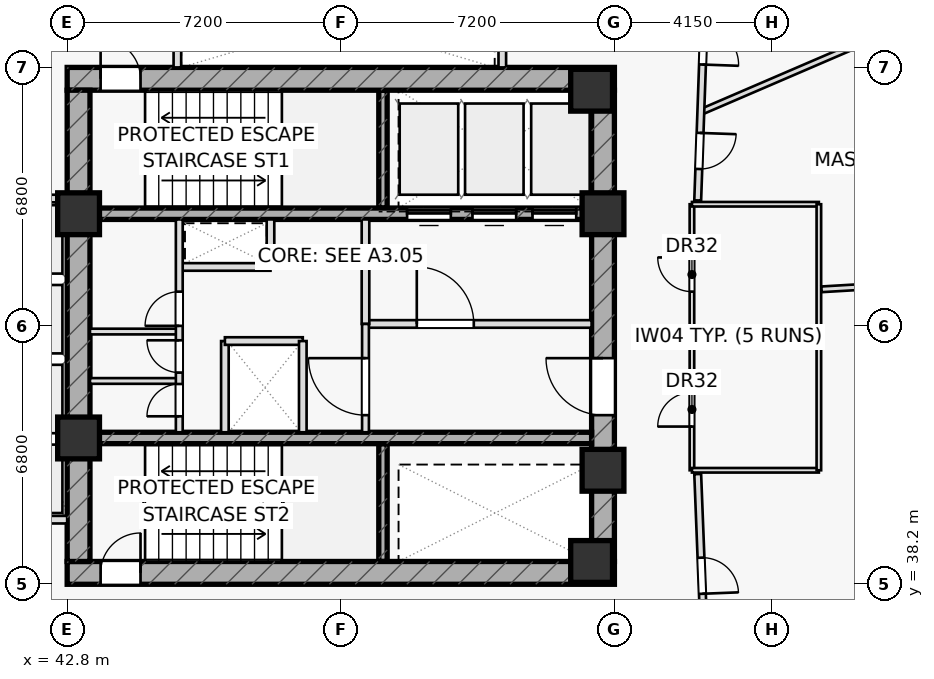
"""IFC4 building model, lengths in metres.
Left out: names, types, materials, properties, quantities, classifications, styles, units other than length and angle.
Written with IfcOpenShell. Run it as: python <this file> out.ifc"""

import sys

from ifc_helpers import new_model, si_unit, direction, frame, frame_2d, origin, origin_2d, place, context, subcontext, project, spatial, rectangle, extrude, element, fill, save


model = new_model("IFC4")
c1 = context("Model", 3, precision=1e-05, world=origin(), true_north=direction((0.0, 1.0)))
c2 = subcontext(c1, "Body", "Model", "MODEL_VIEW")
j1 = project(units=[si_unit("LENGTHUNIT", "METRE"), si_unit("PLANEANGLEUNIT", "RADIAN")], contexts=[c1])
p1 = place(None, origin())
s1 = spatial("IfcSite", under=j1, at=p1, CompositionType="ELEMENT")
p2 = place(p1, origin())
s2 = spatial("IfcBuilding", under=s1, at=p2, CompositionType="ELEMENT")
p3 = place(p2, frame((0.0, 0.0, 54.9)))
s3 = spatial("IfcBuildingStorey", under=s2, at=p3, CompositionType="ELEMENT", Elevation=54.9)
for number, where, z_axis, x_axis in (
    (1, (51.11, 48.1, 0.0), (0.0, 0.0, 1.0), (0.0, 1.0, 0.0)),
    (2, (51.11, 38.8, 0.0), (0.0, 0.0, 1.0), (0.0, 1.0, 0.0)),
):
    element("IfcWall", number, at=place(p3, frame(where, z_axis=z_axis, x_axis=x_axis)), inside=s3, PredefinedType="SHEAR", context=c2, shape_type="SweptSolid", body=[
        extrude(rectangle(XDim=3.1, YDim=0.22, at=frame_2d((1.55, 0.0))), origin(), (0.0, 0.0, 1.0), 3.6),
    ])
p4 = place(p3, frame((42.8, 51.5, 0.0), z_axis=(0.0, 0.0, 1.0), x_axis=(1.0, 0.0, 0.0)))
e3 = element("IfcWall", 3, at=p4, inside=s3, PredefinedType="SHEAR", context=c2, shape_type="SweptSolid", body=[
    extrude(rectangle(XDim=14.4, YDim=0.6, at=frame_2d((7.2, 0.0))), origin(), (0.0, 0.0, 1.0), 3.6),
])
p5 = place(p4, frame((0.88, 0.0, 0.0)))
e4 = element("IfcOpeningElement", 4, at=p5, cuts=e3, PredefinedType="OPENING", context=c2, shape_type="SweptSolid", body=[
    extrude(rectangle(XDim=1.05, YDim=2.2, at=frame_2d((0.525, 1.1))), frame((0.0, 0.31, 0.0), z_axis=(0.0, -1.0, 0.0), x_axis=(1.0, 0.0, 0.0)), (0.0, 0.0, 1.0), 0.62),
])
p6 = place(p3, frame((42.8, 38.5, 0.0), z_axis=(0.0, 0.0, 1.0), x_axis=(1.0, 0.0, 0.0)))
e5 = element("IfcWall", 5, at=p6, inside=s3, PredefinedType="SHEAR", context=c2, shape_type="SweptSolid", body=[
    extrude(rectangle(XDim=14.4, YDim=0.6, at=frame_2d((7.2, 0.0))), origin(), (0.0, 0.0, 1.0), 3.6),
])
p7 = place(p6, frame((0.88, 0.0, 0.0)))
e6 = element("IfcOpeningElement", 6, at=p7, cuts=e5, PredefinedType="OPENING", context=c2, shape_type="SweptSolid", body=[
    extrude(rectangle(XDim=1.05, YDim=2.2, at=frame_2d((0.525, 1.1))), frame((0.0, 0.31, 0.0), z_axis=(0.0, -1.0, 0.0), x_axis=(1.0, 0.0, 0.0)), (0.0, 0.0, 1.0), 0.62),
])
p8 = place(p3, frame((43.1, 38.8, 0.0), z_axis=(0.0, 0.0, 1.0), x_axis=(0.0, 1.0, 0.0)))
e7 = element("IfcWall", 7, at=p8, inside=s3, PredefinedType="SHEAR", context=c2, shape_type="SweptSolid", body=[
    extrude(rectangle(XDim=12.4, YDim=0.6, at=frame_2d((6.2, 0.0))), origin(), (0.0, 0.0, 1.0), 3.6),
])
p9 = place(p3, frame((56.9, 38.8, 0.0), z_axis=(0.0, 0.0, 1.0), x_axis=(0.0, 1.0, 0.0)))
e8 = element("IfcWall", 8, at=p9, inside=s3, PredefinedType="SHEAR", context=c2, shape_type="SweptSolid", body=[
    extrude(rectangle(XDim=12.4, YDim=0.6, at=frame_2d((6.2, 0.0))), origin(), (0.0, 0.0, 1.0), 3.6),
])
p10 = place(p9, frame((3.85, 0.0, 0.0)))
e9 = element("IfcOpeningElement", 9, at=p10, cuts=e8, PredefinedType="OPENING", context=c2, shape_type="SweptSolid", body=[
    extrude(rectangle(XDim=1.5, YDim=2.2, at=frame_2d((0.75, 1.1))), frame((0.0, 0.31, 0.0), z_axis=(0.0, -1.0, 0.0), x_axis=(1.0, 0.0, 0.0)), (0.0, 0.0, 1.0), 0.62),
])
p11 = place(p3, frame((43.4, 47.95, 0.0), z_axis=(0.0, 0.0, 1.0), x_axis=(1.0, 0.0, 0.0)))
e10 = element("IfcWall", 10, at=p11, inside=s3, PredefinedType="SHEAR", context=c2, shape_type="SweptSolid", body=[
    extrude(rectangle(XDim=13.2, YDim=0.3, at=frame_2d((6.6, 0.0))), origin(), (0.0, 0.0, 1.0), 3.6),
])
p12 = place(p11, frame((8.345, 0.0, 0.0)))
e11 = element("IfcOpeningElement", 11, at=p12, cuts=e10, PredefinedType="OPENING", context=c2, shape_type="SweptSolid", body=[
    extrude(rectangle(XDim=1.15, YDim=2.2, at=frame_2d((0.575, 1.1))), frame((0.0, 0.16, 0.0), z_axis=(0.0, -1.0, 0.0), x_axis=(1.0, 0.0, 0.0)), (0.0, 0.0, 1.0), 0.32),
])
p13 = place(p11, frame((10.065, 0.0, 0.0)))
e12 = element("IfcOpeningElement", 12, at=p13, cuts=e10, PredefinedType="OPENING", context=c2, shape_type="SweptSolid", body=[
    extrude(rectangle(XDim=1.15, YDim=2.2, at=frame_2d((0.575, 1.1))), frame((0.0, 0.16, 0.0), z_axis=(0.0, -1.0, 0.0), x_axis=(1.0, 0.0, 0.0)), (0.0, 0.0, 1.0), 0.32),
])
p14 = place(p11, frame((11.645, 0.0, 0.0)))
e13 = element("IfcOpeningElement", 13, at=p14, cuts=e10, PredefinedType="OPENING", context=c2, shape_type="SweptSolid", body=[
    extrude(rectangle(XDim=1.15, YDim=2.2, at=frame_2d((0.575, 1.1))), frame((0.0, 0.16, 0.0), z_axis=(0.0, -1.0, 0.0), x_axis=(1.0, 0.0, 0.0)), (0.0, 0.0, 1.0), 0.32),
])
p15 = place(p3, frame((43.4, 42.05, 0.0), z_axis=(0.0, 0.0, 1.0), x_axis=(1.0, 0.0, 0.0)))
e14 = element("IfcWall", 14, at=p15, inside=s3, PredefinedType="SHEAR", context=c2, shape_type="SweptSolid", body=[
    extrude(rectangle(XDim=13.2, YDim=0.3, at=frame_2d((6.6, 0.0))), origin(), (0.0, 0.0, 1.0), 3.6),
])
for number, where, z_axis, x_axis in (
    (15, (43.1, 47.95, 0.0), (0.0, 0.0, 1.0), (1.0, 0.0, 0.0)),
    (16, (56.9, 47.95, 0.0), (0.0, 0.0, 1.0), (1.0, 0.0, 0.0)),
    (17, (56.6, 51.2, 0.0), (0.0, 0.0, 1.0), (1.0, 0.0, 0.0)),
    (18, (43.1, 42.05, 0.0), (0.0, 0.0, 1.0), (1.0, 0.0, 0.0)),
    (19, (56.9, 41.2, 0.0), (0.0, 0.0, 1.0), (1.0, 0.0, 0.0)),
    (20, (56.6, 38.8, 0.0), (0.0, 0.0, 1.0), (1.0, 0.0, 0.0)),
):
    element("IfcColumn", number, at=place(p3, frame(where, z_axis=z_axis, x_axis=x_axis)), inside=s3, PredefinedType="COLUMN", context=c2, shape_type="SweptSolid", body=[
        extrude(rectangle(XDim=1.1, YDim=1.1, at=origin_2d()), origin(), (0.0, 0.0, 1.0), 3.6),
    ])
for number, where, z_axis, x_axis in (
    (21, (40.3, 39.9, 0.0), (0.0, 0.0, 1.0), (1.0, 0.0, 0.0)),
    (22, (40.3, 48.35, 0.0), (0.0, 0.0, 1.0), (1.0, 0.0, 0.0)),
    (23, (45.7, 51.8, 0.0), (0.0, 0.0, 1.0), (0.0, 1.0, 0.0)),
    (24, (54.25, 51.8, 0.0), (0.0, 0.0, 1.0), (0.0, 1.0, 0.0)),
):
    element("IfcWall", number, at=place(p3, frame(where, z_axis=z_axis, x_axis=x_axis)), inside=s3, PredefinedType="PARTITIONING", context=c2, shape_type="SweptSolid", body=[
        extrude(rectangle(XDim=2.5, YDim=0.2, at=frame_2d((1.25, 0.0))), origin(), (0.0, 0.0, 1.0), 3.6),
    ])
p16 = place(p3, frame((45.75, 46.55, 0.0), z_axis=(0.0, 0.0, 1.0), x_axis=(1.0, 0.0, 0.0)))
e25 = element("IfcWall", 25, at=p16, inside=s3, PredefinedType="PARTITIONING", context=c2, shape_type="SweptSolid", body=[
    extrude(rectangle(XDim=2.4, YDim=0.2, at=frame_2d((1.2, 0.0))), origin(), (0.0, 0.0, 1.0), 3.6),
])
p17 = place(p3, frame((48.15, 46.55, 0.0), z_axis=(0.0, 0.0, 1.0), x_axis=(0.0, 1.0, 0.0)))
e26 = element("IfcWall", 26, at=p17, inside=s3, PredefinedType="PARTITIONING", context=c2, shape_type="SweptSolid", body=[
    extrude(rectangle(XDim=1.25, YDim=0.2, at=frame_2d((0.625, 0.0))), origin(), (0.0, 0.0, 1.0), 3.6),
])
p18 = place(p3, frame((46.95, 42.2, 0.0), z_axis=(0.0, 0.0, 1.0), x_axis=(0.0, 1.0, 0.0)))
e27 = element("IfcWall", 27, at=p18, inside=s3, PredefinedType="PARTITIONING", context=c2, shape_type="SweptSolid", body=[
    extrude(rectangle(XDim=2.4, YDim=0.2, at=frame_2d((1.2, 0.0))), origin(), (0.0, 0.0, 1.0), 3.6),
])
p19 = place(p3, frame((46.95, 44.6, 0.0), z_axis=(0.0, 0.0, 1.0), x_axis=(1.0, 0.0, 0.0)))
e28 = element("IfcWall", 28, at=p19, inside=s3, PredefinedType="PARTITIONING", context=c2, shape_type="SweptSolid", body=[
    extrude(rectangle(XDim=2.05, YDim=0.2, at=frame_2d((1.025, 0.0))), origin(), (0.0, 0.0, 1.0), 3.6),
])
p20 = place(p3, frame((50.65, 45.05, 0.0), z_axis=(0.0, 0.0, 1.0), x_axis=(1.0, 0.0, 0.0)))
e29 = element("IfcWall", 29, at=p20, inside=s3, PredefinedType="PARTITIONING", context=c2, shape_type="SweptSolid", body=[
    extrude(rectangle(XDim=5.95, YDim=0.2, at=frame_2d((2.975, 0.0))), origin(), (0.0, 0.0, 1.0), 3.6),
])
p21 = place(p20, frame((1.35, 0.0, 0.0)))
e30 = element("IfcOpeningElement", 30, at=p21, cuts=e29, PredefinedType="OPENING", context=c2, shape_type="SweptSolid", body=[
    extrude(rectangle(XDim=1.5, YDim=2.2, at=frame_2d((0.75, 1.1))), frame((0.0, 0.11, 0.0), z_axis=(0.0, -1.0, 0.0), x_axis=(1.0, 0.0, 0.0)), (0.0, 0.0, 1.0), 0.22),
])
p22 = place(p3, frame((50.65, 45.05, 0.0), z_axis=(0.0, 0.0, 1.0), x_axis=(0.0, 1.0, 0.0)))
e31 = element("IfcWall", 31, at=p22, inside=s3, PredefinedType="PARTITIONING", context=c2, shape_type="SweptSolid", body=[
    extrude(rectangle(XDim=2.75, YDim=0.2, at=frame_2d((1.375, 0.0))), origin(), (0.0, 0.0, 1.0), 3.6),
])
p23 = place(p3, frame((50.65, 42.2, 0.0), z_axis=(0.0, 0.0, 1.0), x_axis=(0.0, 1.0, 0.0)))
e32 = element("IfcWall", 32, at=p23, inside=s3, PredefinedType="PARTITIONING", context=c2, shape_type="SweptSolid", body=[
    extrude(rectangle(XDim=2.85, YDim=0.18, at=frame_2d((1.425, 0.0))), origin(), (0.0, 0.0, 1.0), 3.6),
])
p24 = place(p23, frame((0.45, 0.0, 0.0)))
e33 = element("IfcOpeningElement", 33, at=p24, cuts=e32, PredefinedType="OPENING", context=c2, shape_type="SweptSolid", body=[
    extrude(rectangle(XDim=1.5, YDim=2.2, at=frame_2d((0.75, 1.1))), frame((0.0, 0.1, 0.0), z_axis=(0.0, -1.0, 0.0), x_axis=(1.0, 0.0, 0.0)), (0.0, 0.0, 1.0), 0.2),
])
for number, where, z_axis, x_axis in (
    (34, (43.4, 43.55, 0.0), (0.0, 0.0, 1.0), (1.0, 0.0, 0.0)),
    (35, (43.4, 44.85, 0.0), (0.0, 0.0, 1.0), (1.0, 0.0, 0.0)),
):
    element("IfcWall", number, at=place(p3, frame(where, z_axis=z_axis, x_axis=x_axis)), inside=s3, PredefinedType="PARTITIONING", context=c2, shape_type="SweptSolid", body=[
        extrude(rectangle(XDim=2.35, YDim=0.15, at=frame_2d((1.175, 0.0))), origin(), (0.0, 0.0, 1.0), 3.6),
    ])
p25 = place(p3, frame((45.75, 42.2, 0.0), z_axis=(0.0, 0.0, 1.0), x_axis=(0.0, 1.0, 0.0)))
e36 = element("IfcWall", 36, at=p25, inside=s3, PredefinedType="PARTITIONING", context=c2, shape_type="SweptSolid", body=[
    extrude(rectangle(XDim=5.6, YDim=0.18, at=frame_2d((2.8, 0.0))), origin(), (0.0, 0.0, 1.0), 3.6),
])
p26 = place(p25, frame((0.42, 0.0, 0.0)))
e37 = element("IfcOpeningElement", 37, at=p26, cuts=e36, PredefinedType="OPENING", context=c2, shape_type="SweptSolid", body=[
    extrude(rectangle(XDim=0.85, YDim=2.05, at=frame_2d((0.425, 1.025))), frame((0.0, 0.1, 0.0), z_axis=(0.0, -1.0, 0.0), x_axis=(1.0, 0.0, 0.0)), (0.0, 0.0, 1.0), 0.2),
])
p27 = place(p25, frame((1.57, 0.0, 0.0)))
e38 = element("IfcOpeningElement", 38, at=p27, cuts=e36, PredefinedType="OPENING", context=c2, shape_type="SweptSolid", body=[
    extrude(rectangle(XDim=0.85, YDim=2.05, at=frame_2d((0.425, 1.025))), frame((0.0, 0.1, 0.0), z_axis=(0.0, -1.0, 0.0), x_axis=(1.0, 0.0, 0.0)), (0.0, 0.0, 1.0), 0.2),
])
p28 = place(p25, frame((2.8, 0.0, 0.0)))
e39 = element("IfcOpeningElement", 39, at=p28, cuts=e36, PredefinedType="OPENING", context=c2, shape_type="SweptSolid", body=[
    extrude(rectangle(XDim=0.9, YDim=2.05, at=frame_2d((0.45, 1.025))), frame((0.0, 0.1, 0.0), z_axis=(0.0, -1.0, 0.0), x_axis=(1.0, 0.0, 0.0)), (0.0, 0.0, 1.0), 0.2),
])
p29 = place(p3, frame((59.24, 41.2, 0.0), z_axis=(0.0, 0.0, 1.0), x_axis=(0.0, 1.0, 0.0)))
e40 = element("IfcWall", 40, at=p29, inside=s3, PredefinedType="PARTITIONING", context=c2, shape_type="SweptSolid", body=[
    extrude(rectangle(XDim=7.0, YDim=0.12, at=frame_2d((3.5, 0.0))), origin(), (0.0, 0.0, 1.0), 3.6),
])
p30 = place(p29, frame((1.15, 0.0, 0.0)))
e41 = element("IfcOpeningElement", 41, at=p30, cuts=e40, PredefinedType="OPENING", context=c2, shape_type="SweptSolid", body=[
    extrude(rectangle(XDim=0.9, YDim=2.05, at=frame_2d((0.45, 1.025))), frame((0.0, 0.07, 0.0), z_axis=(0.0, -1.0, 0.0), x_axis=(1.0, 0.0, 0.0)), (0.0, 0.0, 1.0), 0.14),
])
p31 = place(p29, frame((4.7, 0.0, 0.0)))
e42 = element("IfcOpeningElement", 42, at=p31, cuts=e40, PredefinedType="OPENING", context=c2, shape_type="SweptSolid", body=[
    extrude(rectangle(XDim=0.9, YDim=2.05, at=frame_2d((0.45, 1.025))), frame((0.0, 0.07, 0.0), z_axis=(0.0, -1.0, 0.0), x_axis=(1.0, 0.0, 0.0)), (0.0, 0.0, 1.0), 0.14),
])
p32 = place(p3, frame((59.24, 41.2, 0.0), z_axis=(0.0, 0.0, 1.0), x_axis=(1.0, 0.0, 0.0)))
e43 = element("IfcWall", 43, at=p32, inside=s3, PredefinedType="PARTITIONING", context=c2, shape_type="SweptSolid", body=[
    extrude(rectangle(XDim=3.34, YDim=0.12, at=frame_2d((1.67, 0.0))), origin(), (0.0, 0.0, 1.0), 2.925),
])
for number, where, z_axis, x_axis in (
    (44, (59.24, 44.65, 0.0), (0.0, 0.0, 1.0), (1.0, 0.0, 0.0)),
    (45, (59.24, 48.2, 0.0), (0.0, 0.0, 1.0), (1.0, 0.0, 0.0)),
):
    element("IfcWall", number, at=place(p3, frame(where, z_axis=z_axis, x_axis=x_axis)), inside=s3, PredefinedType="PARTITIONING", context=c2, shape_type="SweptSolid", body=[
        extrude(rectangle(XDim=3.34, YDim=0.12, at=frame_2d((1.67, 0.0))), origin(), (0.0, 0.0, 1.0), 3.6),
    ])
p33 = place(p3, frame((62.58, 41.2, 0.0), z_axis=(0.0, 0.0, 1.0), x_axis=(0.0, 1.0, 0.0)))
e46 = element("IfcWall", 46, at=p33, inside=s3, PredefinedType="PARTITIONING", context=c2, shape_type="SweptSolid", body=[
    extrude(rectangle(XDim=7.0, YDim=0.12, at=frame_2d((3.5, 0.0))), origin(), (0.0, 0.0, 1.0), 3.6),
])
p34 = place(p3, frame((62.65, 45.961, 0.0), z_axis=(0.0, 0.0, 1.0), x_axis=(0.998256468531, 0.059025613391, 0.0)))
e47 = element("IfcWall", 47, at=p34, inside=s3, PredefinedType="PARTITIONING", context=c2, shape_type="SweptSolid", body=[
    extrude(rectangle(XDim=10.088, YDim=0.15, at=frame_2d((5.044, 0.0))), origin(), (0.0, 0.0, 1.0), 2.975),
])
p35 = place(p3, frame((59.474, 50.627, 0.0), z_axis=(0.0, 0.0, 1.0), x_axis=(0.918535829974, 0.395337740488, 0.0)))
e48 = element("IfcWall", 48, at=p35, inside=s3, PredefinedType="PARTITIONING", context=c2, shape_type="SweptSolid", body=[
    extrude(rectangle(XDim=9.677, YDim=0.15, at=frame_2d((4.838, 0.0))), origin(), (0.0, 0.0, 1.0), 2.925),
])
p36 = place(p3, frame((59.602, 54.25, 0.0), z_axis=(0.0, 0.0, 1.0), x_axis=(-0.035265891834, -0.999377964973, 0.0)))
e49 = element("IfcWall", 49, at=p36, inside=s3, PredefinedType="PARTITIONING", context=c2, shape_type="SweptSolid", body=[
    extrude(rectangle(XDim=5.954, YDim=0.18, at=frame_2d((2.977, 0.0))), origin(), (0.0, 0.0, 1.0), 2.925),
])
p37 = place(p36, frame((1.426, 0.0, 0.0)))
e50 = element("IfcOpeningElement", 50, at=p37, cuts=e49, PredefinedType="OPENING", context=c2, shape_type="SweptSolid", body=[
    extrude(rectangle(XDim=0.95, YDim=2.05, at=frame_2d((0.475, 1.025))), frame((0.0, 0.1, 0.0), z_axis=(0.0, -1.0, 0.0), x_axis=(1.0, 0.0, 0.0)), (0.0, 0.0, 1.0), 0.2),
])
p38 = place(p36, frame((4.176, 0.0, 0.0)))
e51 = element("IfcOpeningElement", 51, at=p38, cuts=e49, PredefinedType="OPENING", context=c2, shape_type="SweptSolid", body=[
    extrude(rectangle(XDim=0.95, YDim=2.05, at=frame_2d((0.475, 1.025))), frame((0.0, 0.1, 0.0), z_axis=(0.0, -1.0, 0.0), x_axis=(1.0, 0.0, 0.0)), (0.0, 0.0, 1.0), 0.2),
])
p39 = place(p3, frame((59.392, 41.1, 0.0), z_axis=(0.0, 0.0, 1.0), x_axis=(0.03921413315, -0.999230830069, 0.0)))
e52 = element("IfcWall", 52, at=p39, inside=s3, PredefinedType="PARTITIONING", context=c2, shape_type="SweptSolid", body=[
    extrude(rectangle(XDim=5.354, YDim=0.18, at=frame_2d((2.677, 0.0))), origin(), (0.0, 0.0, 1.0), 2.925),
])
p40 = place(p39, frame((2.202, 0.0, 0.0)))
e53 = element("IfcOpeningElement", 53, at=p40, cuts=e52, PredefinedType="OPENING", context=c2, shape_type="SweptSolid", body=[
    extrude(rectangle(XDim=0.95, YDim=2.05, at=frame_2d((0.475, 1.025))), frame((0.0, 0.1, 0.0), z_axis=(0.0, -1.0, 0.0), x_axis=(1.0, 0.0, 0.0)), (0.0, 0.0, 1.0), 0.2),
])
p41 = place(p3, frame((49.0, 42.2, 0.0), z_axis=(0.0, 0.0, 1.0), x_axis=(0.0, 1.0, 0.0)))
e54 = element("IfcWall", 54, at=p41, inside=s3, PredefinedType="PARTITIONING", context=c2, shape_type="SweptSolid", body=[
    extrude(rectangle(XDim=2.4, YDim=0.2, at=frame_2d((1.2, 0.0))), origin(), (0.0, 0.0, 1.0), 3.6),
])
p42 = place(p5, origin())
e55 = element("IfcDoor", 55, at=p42, inside=s3, OperationType="SINGLE_SWING_LEFT", PredefinedType="DOOR", context=c2, shape_type="SweptSolid", body=[
    extrude(rectangle(XDim=1.05, YDim=2.2, at=frame_2d((0.525, 1.1))), frame((0.0, 0.025, 0.0), z_axis=(0.0, -1.0, 0.0), x_axis=(1.0, 0.0, 0.0)), (0.0, 0.0, 1.0), 0.05),
])
fill(e4, e55)
p43 = place(p7, origin())
e56 = element("IfcDoor", 56, at=p43, inside=s3, OperationType="SINGLE_SWING_RIGHT", PredefinedType="DOOR", context=c2, shape_type="SweptSolid", body=[
    extrude(rectangle(XDim=1.05, YDim=2.2, at=frame_2d((0.525, 1.1))), frame((0.0, 0.025, 0.0), z_axis=(0.0, -1.0, 0.0), x_axis=(1.0, 0.0, 0.0)), (0.0, 0.0, 1.0), 0.05),
])
fill(e6, e56)
p44 = place(p10, origin())
e57 = element("IfcDoor", 57, at=p44, inside=s3, OperationType="SINGLE_SWING_RIGHT", PredefinedType="DOOR", context=c2, shape_type="SweptSolid", body=[
    extrude(rectangle(XDim=1.5, YDim=2.2, at=frame_2d((0.75, 1.1))), frame((0.0, 0.025, 0.0), z_axis=(0.0, -1.0, 0.0), x_axis=(1.0, 0.0, 0.0)), (0.0, 0.0, 1.0), 0.05),
])
fill(e9, e57)
p45 = place(p21, origin())
e58 = element("IfcDoor", 58, at=p45, inside=s3, OperationType="SINGLE_SWING_LEFT", PredefinedType="DOOR", context=c2, shape_type="SweptSolid", body=[
    extrude(rectangle(XDim=1.5, YDim=2.2, at=frame_2d((0.75, 1.1))), frame((0.0, 0.025, 0.0), z_axis=(0.0, -1.0, 0.0), x_axis=(1.0, 0.0, 0.0)), (0.0, 0.0, 1.0), 0.05),
])
fill(e30, e58)
p46 = place(p24, origin())
e59 = element("IfcDoor", 59, at=p46, inside=s3, OperationType="SINGLE_SWING_RIGHT", PredefinedType="DOOR", context=c2, shape_type="SweptSolid", body=[
    extrude(rectangle(XDim=1.5, YDim=2.2, at=frame_2d((0.75, 1.1))), frame((0.0, 0.025, 0.0), z_axis=(0.0, -1.0, 0.0), x_axis=(1.0, 0.0, 0.0)), (0.0, 0.0, 1.0), 0.05),
])
fill(e33, e59)
p47 = place(p26, origin())
e60 = element("IfcDoor", 60, at=p47, inside=s3, OperationType="SINGLE_SWING_LEFT", PredefinedType="DOOR", context=c2, shape_type="SweptSolid", body=[
    extrude(rectangle(XDim=0.85, YDim=2.05, at=frame_2d((0.425, 1.025))), frame((0.0, 0.025, 0.0), z_axis=(0.0, -1.0, 0.0), x_axis=(1.0, 0.0, 0.0)), (0.0, 0.0, 1.0), 0.05),
])
fill(e37, e60)
p48 = place(p27, origin())
e61 = element("IfcDoor", 61, at=p48, inside=s3, OperationType="SINGLE_SWING_RIGHT", PredefinedType="DOOR", context=c2, shape_type="SweptSolid", body=[
    extrude(rectangle(XDim=0.85, YDim=2.05, at=frame_2d((0.425, 1.025))), frame((0.0, 0.025, 0.0), z_axis=(0.0, -1.0, 0.0), x_axis=(1.0, 0.0, 0.0)), (0.0, 0.0, 1.0), 0.05),
])
fill(e38, e61)
p49 = place(p28, origin())
e62 = element("IfcDoor", 62, at=p49, inside=s3, OperationType="SINGLE_SWING_LEFT", PredefinedType="DOOR", context=c2, shape_type="SweptSolid", body=[
    extrude(rectangle(XDim=0.9, YDim=2.05, at=frame_2d((0.45, 1.025))), frame((0.0, 0.025, 0.0), z_axis=(0.0, -1.0, 0.0), x_axis=(1.0, 0.0, 0.0)), (0.0, 0.0, 1.0), 0.05),
])
fill(e39, e62)
p50 = place(p30, origin())
e63 = element("IfcDoor", 63, at=p50, inside=s3, OperationType="SINGLE_SWING_LEFT", PredefinedType="DOOR", context=c2, shape_type="SweptSolid", body=[
    extrude(rectangle(XDim=0.9, YDim=2.05, at=frame_2d((0.45, 1.025))), frame((0.0, 0.025, 0.0), z_axis=(0.0, -1.0, 0.0), x_axis=(1.0, 0.0, 0.0)), (0.0, 0.0, 1.0), 0.05),
])
fill(e41, e63)
p51 = place(p31, origin())
e64 = element("IfcDoor", 64, at=p51, inside=s3, OperationType="SINGLE_SWING_RIGHT", PredefinedType="DOOR", context=c2, shape_type="SweptSolid", body=[
    extrude(rectangle(XDim=0.9, YDim=2.05, at=frame_2d((0.45, 1.025))), frame((0.0, 0.025, 0.0), z_axis=(0.0, -1.0, 0.0), x_axis=(1.0, 0.0, 0.0)), (0.0, 0.0, 1.0), 0.05),
])
fill(e42, e64)
p52 = place(p37, origin())
e65 = element("IfcDoor", 65, at=p52, inside=s3, OperationType="SINGLE_SWING_RIGHT", PredefinedType="DOOR", context=c2, shape_type="SweptSolid", body=[
    extrude(rectangle(XDim=0.95, YDim=2.05, at=frame_2d((0.475, 1.025))), frame((0.0, 0.025, 0.0), z_axis=(0.0, -1.0, 0.0), x_axis=(1.0, 0.0, 0.0)), (0.0, 0.0, 1.0), 0.05),
])
fill(e50, e65)
p53 = place(p38, origin())
e66 = element("IfcDoor", 66, at=p53, inside=s3, OperationType="SINGLE_SWING_LEFT", PredefinedType="DOOR", context=c2, shape_type="SweptSolid", body=[
    extrude(rectangle(XDim=0.95, YDim=2.05, at=frame_2d((0.475, 1.025))), frame((0.0, 0.025, 0.0), z_axis=(0.0, -1.0, 0.0), x_axis=(1.0, 0.0, 0.0)), (0.0, 0.0, 1.0), 0.05),
])
fill(e51, e66)
p54 = place(p40, origin())
e67 = element("IfcDoor", 67, at=p54, inside=s3, OperationType="SINGLE_SWING_RIGHT", PredefinedType="DOOR", context=c2, shape_type="SweptSolid", body=[
    extrude(rectangle(XDim=0.95, YDim=2.05, at=frame_2d((0.475, 1.025))), frame((0.0, 0.025, 0.0), z_axis=(0.0, -1.0, 0.0), x_axis=(1.0, 0.0, 0.0)), (0.0, 0.0, 1.0), 0.05),
])
fill(e53, e67)
p55 = place(p12, origin())
e68 = element("IfcDoor", 68, at=p55, inside=s3, OperationType="SLIDING_TO_LEFT", PredefinedType="DOOR", context=c2, shape_type="SweptSolid", body=[
    extrude(rectangle(XDim=1.15, YDim=2.2, at=frame_2d((0.575, 1.1))), frame((0.0, 0.025, 0.0), z_axis=(0.0, -1.0, 0.0), x_axis=(1.0, 0.0, 0.0)), (0.0, 0.0, 1.0), 0.05),
])
fill(e11, e68)
p56 = place(p13, origin())
e69 = element("IfcDoor", 69, at=p56, inside=s3, OperationType="SLIDING_TO_LEFT", PredefinedType="DOOR", context=c2, shape_type="SweptSolid", body=[
    extrude(rectangle(XDim=1.15, YDim=2.2, at=frame_2d((0.575, 1.1))), frame((0.0, 0.025, 0.0), z_axis=(0.0, -1.0, 0.0), x_axis=(1.0, 0.0, 0.0)), (0.0, 0.0, 1.0), 0.05),
])
fill(e12, e69)
p57 = place(p14, origin())
e70 = element("IfcDoor", 70, at=p57, inside=s3, OperationType="SLIDING_TO_LEFT", PredefinedType="DOOR", context=c2, shape_type="SweptSolid", body=[
    extrude(rectangle(XDim=1.15, YDim=2.2, at=frame_2d((0.575, 1.1))), frame((0.0, 0.025, 0.0), z_axis=(0.0, -1.0, 0.0), x_axis=(1.0, 0.0, 0.0)), (0.0, 0.0, 1.0), 0.05),
])
fill(e13, e70)
save(model, sys.argv[1])
